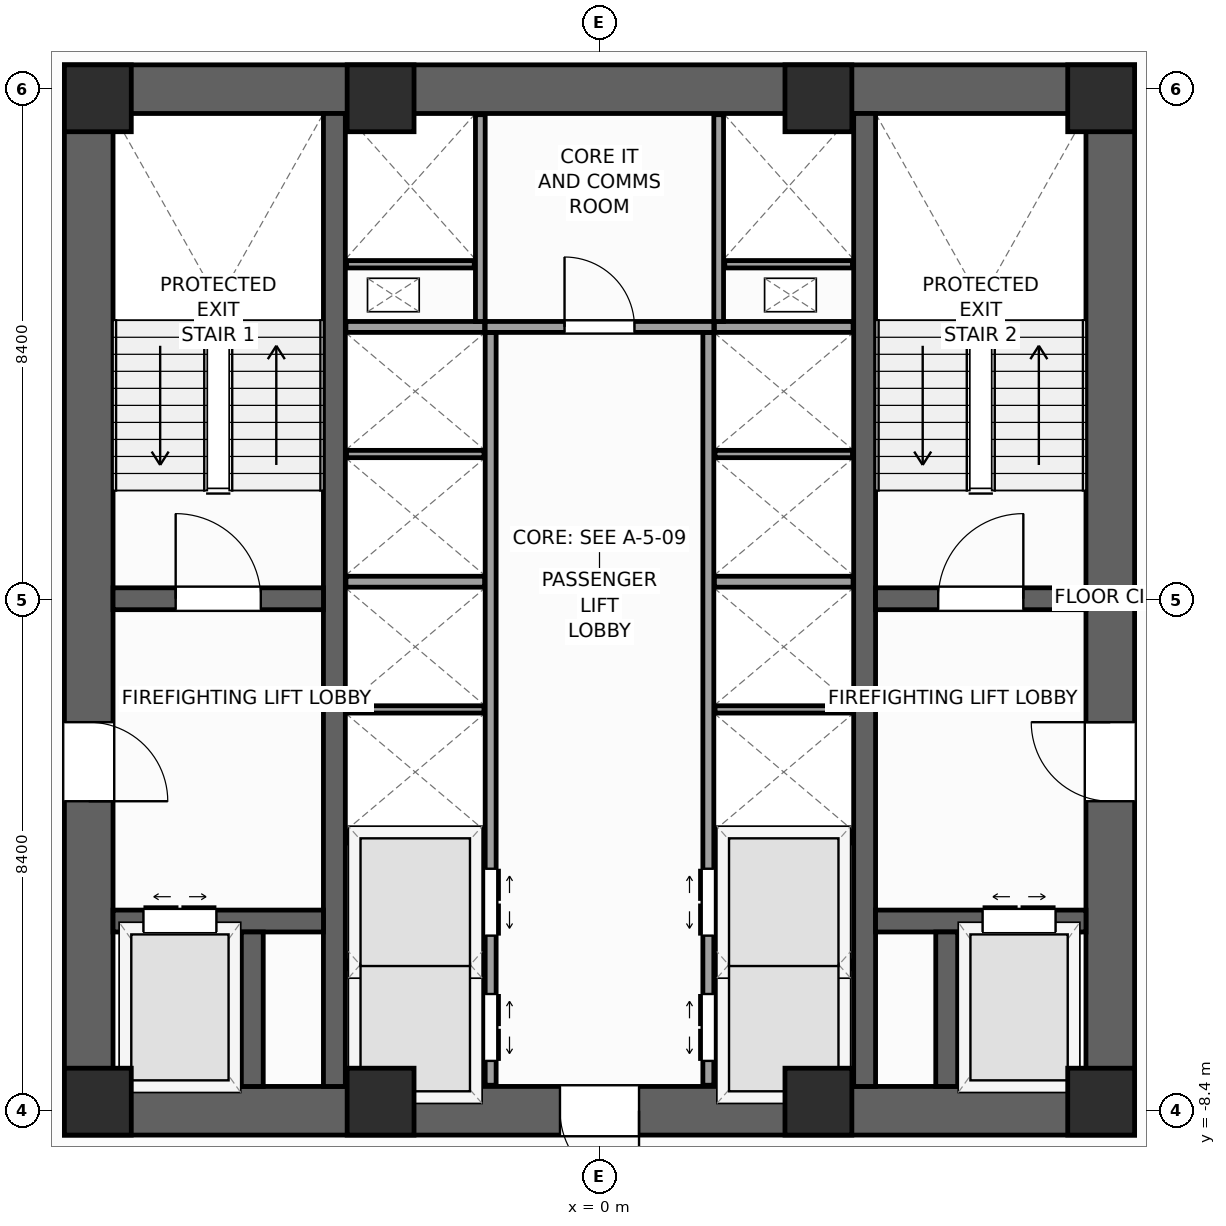
"""IFC4 building model, lengths in metres.
Left out: names, types, materials, properties, quantities, classifications, styles, units other than length and angle.
Written with IfcOpenShell. Run it as: python <this file> out.ifc"""

import sys

from ifc_helpers import new_model, si_unit, direction, frame, frame_2d, origin, origin_2d, place, context, subcontext, project, spatial, rectangle, extrude, source, transform, mapped, element, fill, save


model = new_model("IFC4")
c1 = context("Model", 3, precision=1e-05, world=origin(), true_north=direction((0.0, 1.0)))
c2 = subcontext(c1, "Body", "Model", "MODEL_VIEW")
j1 = project(units=[si_unit("LENGTHUNIT", "METRE"), si_unit("PLANEANGLEUNIT", "RADIAN")], contexts=[c1])
p1 = place(None, origin())
s1 = spatial("IfcSite", under=j1, at=p1, CompositionType="ELEMENT")
p2 = place(p1, origin())
s2 = spatial("IfcBuilding", under=s1, at=p2, CompositionType="ELEMENT")
p3 = place(p2, frame((0.0, 0.0, 34.0)))
s3 = spatial("IfcBuildingStorey", under=s2, at=p3, CompositionType="ELEMENT", Elevation=34.0)
p4 = place(p3, frame((-8.8, -8.4, 0.0), z_axis=(0.0, 0.0, 1.0), x_axis=(1.0, 0.0, 0.0)))
e1 = element("IfcWall", 1, at=p4, inside=s3, PredefinedType="SHEAR", context=c2, shape_type="SweptSolid", body=[
    extrude(rectangle(XDim=17.6, YDim=0.8, at=frame_2d((8.8, 0.0))), origin(), (0.0, 0.0, 1.0), 4.0),
])
p5 = place(p4, frame((8.15, 0.0, 0.0)))
e2 = element("IfcOpeningElement", 2, at=p5, cuts=e1, PredefinedType="OPENING", context=c2, shape_type="SweptSolid", body=[
    extrude(rectangle(XDim=1.3, YDim=2.2, at=frame_2d((0.65, 1.1))), frame((0.0, 0.41, 0.0), z_axis=(0.0, -1.0, 0.0), x_axis=(1.0, 0.0, 0.0)), (0.0, 0.0, 1.0), 0.82),
])
p6 = place(p3, frame((-8.8, 8.4, 0.0), z_axis=(0.0, 0.0, 1.0), x_axis=(1.0, 0.0, 0.0)))
e3 = element("IfcWall", 3, at=p6, inside=s3, PredefinedType="SHEAR", context=c2, shape_type="SweptSolid", body=[
    extrude(rectangle(XDim=17.6, YDim=0.8, at=frame_2d((8.8, 0.0))), origin(), (0.0, 0.0, 1.0), 4.0),
])
p7 = place(p3, frame((-8.4, -8.0, 0.0), z_axis=(0.0, 0.0, 1.0), x_axis=(0.0, 1.0, 0.0)))
e4 = element("IfcWall", 4, at=p7, inside=s3, PredefinedType="SHEAR", context=c2, shape_type="SweptSolid", body=[
    extrude(rectangle(XDim=16.0, YDim=0.8, at=frame_2d((8.0, 0.0))), origin(), (0.0, 0.0, 1.0), 4.0),
])
p8 = place(p7, frame((4.69, 0.0, 0.0)))
e5 = element("IfcOpeningElement", 5, at=p8, cuts=e4, PredefinedType="OPENING", context=c2, shape_type="SweptSolid", body=[
    extrude(rectangle(XDim=1.3, YDim=2.2, at=frame_2d((0.65, 1.1))), frame((0.0, 0.41, 0.0), z_axis=(0.0, -1.0, 0.0), x_axis=(1.0, 0.0, 0.0)), (0.0, 0.0, 1.0), 0.82),
])
p9 = place(p3, frame((8.4, -8.0, 0.0), z_axis=(0.0, 0.0, 1.0), x_axis=(0.0, 1.0, 0.0)))
e6 = element("IfcWall", 6, at=p9, inside=s3, PredefinedType="SHEAR", context=c2, shape_type="SweptSolid", body=[
    extrude(rectangle(XDim=16.0, YDim=0.8, at=frame_2d((8.0, 0.0))), origin(), (0.0, 0.0, 1.0), 4.0),
])
p10 = place(p9, frame((4.69, 0.0, 0.0)))
e7 = element("IfcOpeningElement", 7, at=p10, cuts=e6, PredefinedType="OPENING", context=c2, shape_type="SweptSolid", body=[
    extrude(rectangle(XDim=1.3, YDim=2.2, at=frame_2d((0.65, 1.1))), frame((0.0, 0.41, 0.0), z_axis=(0.0, -1.0, 0.0), x_axis=(1.0, 0.0, 0.0)), (0.0, 0.0, 1.0), 0.82),
])
for number, where, z_axis, x_axis in (
    (8, (-4.36, -8.0, 0.0), (0.0, 0.0, 1.0), (0.0, 1.0, 0.0)),
    (9, (4.36, -8.0, 0.0), (0.0, 0.0, 1.0), (0.0, 1.0, 0.0)),
):
    element("IfcWall", number, at=place(p3, frame(where, z_axis=z_axis, x_axis=x_axis)), inside=s3, PredefinedType="SHEAR", context=c2, shape_type="SweptSolid", body=[
        extrude(rectangle(XDim=16.0, YDim=0.36, at=frame_2d((8.0, 0.0))), origin(), (0.0, 0.0, 1.0), 4.0),
    ])
p11 = place(p3, frame((-8.0, 0.02, 0.0), z_axis=(0.0, 0.0, 1.0), x_axis=(1.0, 0.0, 0.0)))
e10 = element("IfcWall", 10, at=p11, inside=s3, PredefinedType="SHEAR", context=c2, shape_type="SweptSolid", body=[
    extrude(rectangle(XDim=3.46, YDim=0.36, at=frame_2d((1.73, 0.0))), origin(), (0.0, 0.0, 1.0), 4.0),
])
p12 = place(p11, frame((1.03, 0.0, 0.0)))
e11 = element("IfcOpeningElement", 11, at=p12, cuts=e10, PredefinedType="OPENING", context=c2, shape_type="SweptSolid", body=[
    extrude(rectangle(XDim=1.4, YDim=2.2, at=frame_2d((0.7, 1.1))), frame((0.0, 0.19, 0.0), z_axis=(0.0, -1.0, 0.0), x_axis=(1.0, 0.0, 0.0)), (0.0, 0.0, 1.0), 0.38),
])
p13 = place(p3, frame((4.54, 0.02, 0.0), z_axis=(0.0, 0.0, 1.0), x_axis=(1.0, 0.0, 0.0)))
e12 = element("IfcWall", 12, at=p13, inside=s3, PredefinedType="SHEAR", context=c2, shape_type="SweptSolid", body=[
    extrude(rectangle(XDim=3.46, YDim=0.36, at=frame_2d((1.73, 0.0))), origin(), (0.0, 0.0, 1.0), 4.0),
])
p14 = place(p13, frame((1.03, 0.0, 0.0)))
e13 = element("IfcOpeningElement", 13, at=p14, cuts=e12, PredefinedType="OPENING", context=c2, shape_type="SweptSolid", body=[
    extrude(rectangle(XDim=1.4, YDim=2.2, at=frame_2d((0.7, 1.1))), frame((0.0, 0.19, 0.0), z_axis=(0.0, -1.0, 0.0), x_axis=(1.0, 0.0, 0.0)), (0.0, 0.0, 1.0), 0.38),
])
p15 = place(p3, frame((-8.0, -5.28, 0.0), z_axis=(0.0, 0.0, 1.0), x_axis=(1.0, 0.0, 0.0)))
e14 = element("IfcWall", 14, at=p15, inside=s3, PredefinedType="SHEAR", context=c2, shape_type="SweptSolid", body=[
    extrude(rectangle(XDim=3.46, YDim=0.36, at=frame_2d((1.73, 0.0))), origin(), (0.0, 0.0, 1.0), 4.0),
])
p16 = place(p15, frame((0.5, 0.0, 0.0)))
e15 = element("IfcOpeningElement", 15, at=p16, cuts=e14, PredefinedType="OPENING", context=c2, shape_type="SweptSolid", body=[
    extrude(rectangle(XDim=1.2, YDim=2.25, at=frame_2d((0.6, 1.125))), frame((0.0, 0.19, 0.0), z_axis=(0.0, -1.0, 0.0), x_axis=(1.0, 0.0, 0.0)), (0.0, 0.0, 1.0), 0.38),
])
p17 = place(p3, frame((4.54, -5.28, 0.0), z_axis=(0.0, 0.0, 1.0), x_axis=(1.0, 0.0, 0.0)))
e16 = element("IfcWall", 16, at=p17, inside=s3, PredefinedType="SHEAR", context=c2, shape_type="SweptSolid", body=[
    extrude(rectangle(XDim=3.46, YDim=0.36, at=frame_2d((1.73, 0.0))), origin(), (0.0, 0.0, 1.0), 4.0),
])
p18 = place(p17, frame((1.76, 0.0, 0.0)))
e17 = element("IfcOpeningElement", 17, at=p18, cuts=e16, PredefinedType="OPENING", context=c2, shape_type="SweptSolid", body=[
    extrude(rectangle(XDim=1.2, YDim=2.25, at=frame_2d((0.6, 1.125))), frame((0.0, 0.19, 0.0), z_axis=(0.0, -1.0, 0.0), x_axis=(1.0, 0.0, 0.0)), (0.0, 0.0, 1.0), 0.38),
])
for number, where, z_axis, x_axis in (
    (18, (-5.71, -8.0, 0.0), (0.0, 0.0, 1.0), (0.0, 1.0, 0.0)),
    (19, (5.71, -8.0, 0.0), (0.0, 0.0, 1.0), (0.0, 1.0, 0.0)),
):
    element("IfcWall", number, at=place(p3, frame(where, z_axis=z_axis, x_axis=x_axis)), inside=s3, PredefinedType="SHEAR", context=c2, shape_type="SweptSolid", body=[
        extrude(rectangle(XDim=2.54, YDim=0.36, at=frame_2d((1.27, 0.0))), origin(), (0.0, 0.0, 1.0), 4.0),
    ])
m1 = source(origin(), c2, "Body", "SweptSolid", [
    extrude(rectangle(XDim=1.1, YDim=1.1, at=origin_2d()), origin(), (0.0, 0.0, 1.0), 4.0),
])
for number, where, z_axis, x_axis in (
    (20, (-8.25, -8.25, 0.0), (0.0, 0.0, 1.0), (1.0, 0.0, 0.0)),
    (21, (8.25, -8.25, 0.0), (0.0, 0.0, 1.0), (1.0, 0.0, 0.0)),
    (22, (8.25, 8.25, 0.0), (0.0, 0.0, 1.0), (1.0, 0.0, 0.0)),
    (23, (-8.25, 8.25, 0.0), (0.0, 0.0, 1.0), (1.0, 0.0, 0.0)),
    (24, (-3.6, -8.25, 0.0), (0.0, 0.0, 1.0), (1.0, 0.0, 0.0)),
    (25, (3.6, -8.25, 0.0), (0.0, 0.0, 1.0), (1.0, 0.0, 0.0)),
    (26, (-3.6, 8.25, 0.0), (0.0, 0.0, 1.0), (1.0, 0.0, 0.0)),
    (27, (3.6, 8.25, 0.0), (0.0, 0.0, 1.0), (1.0, 0.0, 0.0)),
):
    element("IfcColumn", number, at=place(p3, frame(where, z_axis=z_axis, x_axis=x_axis)), inside=s3, PredefinedType="PILASTER", context=c2, shape_type="MappedRepresentation", body=[
        mapped(m1, transform((0.0, 0.0, 0.0), scale=1.0)),
    ])
p19 = place(p3, frame((-1.79, -7.98, 0.0), z_axis=(0.0, 0.0, 1.0), x_axis=(0.0, 1.0, 0.0)))
e28 = element("IfcWall", 28, at=p19, inside=s3, PredefinedType="PARTITIONING", context=c2, shape_type="SweptSolid", body=[
    extrude(rectangle(XDim=12.38, YDim=0.18, at=frame_2d((6.19, 0.0))), origin(), (0.0, 0.0, 1.0), 3.72),
])
p20 = place(p19, frame((0.4, 0.0, 0.0)))
e29 = element("IfcOpeningElement", 29, at=p20, cuts=e28, PredefinedType="OPENING", context=c2, shape_type="SweptSolid", body=[
    extrude(rectangle(XDim=1.1, YDim=2.2, at=frame_2d((0.55, 1.1))), frame((0.0, 0.1, 0.0), z_axis=(0.0, -1.0, 0.0), x_axis=(1.0, 0.0, 0.0)), (0.0, 0.0, 1.0), 0.2),
])
p21 = place(p19, frame((2.46, 0.0, 0.0)))
e30 = element("IfcOpeningElement", 30, at=p21, cuts=e28, PredefinedType="OPENING", context=c2, shape_type="SweptSolid", body=[
    extrude(rectangle(XDim=1.1, YDim=2.2, at=frame_2d((0.55, 1.1))), frame((0.0, 0.1, 0.0), z_axis=(0.0, -1.0, 0.0), x_axis=(1.0, 0.0, 0.0)), (0.0, 0.0, 1.0), 0.2),
])
p22 = place(p3, frame((1.79, -7.98, 0.0), z_axis=(0.0, 0.0, 1.0), x_axis=(0.0, 1.0, 0.0)))
e31 = element("IfcWall", 31, at=p22, inside=s3, PredefinedType="PARTITIONING", context=c2, shape_type="SweptSolid", body=[
    extrude(rectangle(XDim=12.38, YDim=0.18, at=frame_2d((6.19, 0.0))), origin(), (0.0, 0.0, 1.0), 3.72),
])
p23 = place(p22, frame((0.4, 0.0, 0.0)))
e32 = element("IfcOpeningElement", 32, at=p23, cuts=e31, PredefinedType="OPENING", context=c2, shape_type="SweptSolid", body=[
    extrude(rectangle(XDim=1.1, YDim=2.2, at=frame_2d((0.55, 1.1))), frame((0.0, 0.1, 0.0), z_axis=(0.0, -1.0, 0.0), x_axis=(1.0, 0.0, 0.0)), (0.0, 0.0, 1.0), 0.2),
])
p24 = place(p22, frame((2.46, 0.0, 0.0)))
e33 = element("IfcOpeningElement", 33, at=p24, cuts=e31, PredefinedType="OPENING", context=c2, shape_type="SweptSolid", body=[
    extrude(rectangle(XDim=1.1, YDim=2.2, at=frame_2d((0.55, 1.1))), frame((0.0, 0.1, 0.0), z_axis=(0.0, -1.0, 0.0), x_axis=(1.0, 0.0, 0.0)), (0.0, 0.0, 1.0), 0.2),
])
p25 = place(p3, frame((-1.88, 4.49, 0.0), z_axis=(0.0, 0.0, 1.0), x_axis=(1.0, 0.0, 0.0)))
e34 = element("IfcWall", 34, at=p25, inside=s3, PredefinedType="PARTITIONING", context=c2, shape_type="SweptSolid", body=[
    extrude(rectangle(XDim=3.76, YDim=0.18, at=frame_2d((1.88, 0.0))), origin(), (0.0, 0.0, 1.0), 3.72),
])
p26 = place(p25, frame((1.305, 0.0, 0.0)))
e35 = element("IfcOpeningElement", 35, at=p26, cuts=e34, PredefinedType="OPENING", context=c2, shape_type="SweptSolid", body=[
    extrude(rectangle(XDim=1.15, YDim=2.25, at=frame_2d((0.575, 1.125))), frame((0.0, 0.1, 0.0), z_axis=(0.0, -1.0, 0.0), x_axis=(1.0, 0.0, 0.0)), (0.0, 0.0, 1.0), 0.2),
])
for number, where, z_axis, x_axis in (
    (36, (-4.17, -3.9, 0.0), (0.0, 0.0, 1.0), (1.0, 0.0, 0.0)),
    (37, (1.89, -3.9, 0.0), (0.0, 0.0, 1.0), (1.0, 0.0, 0.0)),
    (38, (-4.17, 0.3, 0.0), (0.0, 0.0, 1.0), (1.0, 0.0, 0.0)),
    (39, (1.89, 0.3, 0.0), (0.0, 0.0, 1.0), (1.0, 0.0, 0.0)),
    (40, (-4.17, 4.49, 0.0), (0.0, 0.0, 1.0), (1.0, 0.0, 0.0)),
    (41, (1.89, 4.49, 0.0), (0.0, 0.0, 1.0), (1.0, 0.0, 0.0)),
):
    element("IfcWall", number, at=place(p3, frame(where, z_axis=z_axis, x_axis=x_axis)), inside=s3, PredefinedType="PARTITIONING", context=c2, shape_type="SweptSolid", body=[
        extrude(rectangle(XDim=2.28, YDim=0.18, at=frame_2d((1.14, 0.0))), origin(), (0.0, 0.0, 1.0), 3.72),
    ])
for number, where, z_axis, x_axis in (
    (42, (-4.16, -6.0, 0.0), (0.0, 0.0, 1.0), (1.0, 0.0, 0.0)),
    (43, (1.9, -6.0, 0.0), (0.0, 0.0, 1.0), (1.0, 0.0, 0.0)),
    (44, (-4.16, -1.8, 0.0), (0.0, 0.0, 1.0), (1.0, 0.0, 0.0)),
    (45, (1.9, -1.8, 0.0), (0.0, 0.0, 1.0), (1.0, 0.0, 0.0)),
    (46, (-4.16, 2.4, 0.0), (0.0, 0.0, 1.0), (1.0, 0.0, 0.0)),
    (47, (1.9, 2.4, 0.0), (0.0, 0.0, 1.0), (1.0, 0.0, 0.0)),
):
    element("IfcWall", number, at=place(p3, frame(where, z_axis=z_axis, x_axis=x_axis)), inside=s3, PredefinedType="PARTITIONING", context=c2, shape_type="SweptSolid", body=[
        extrude(rectangle(XDim=2.26, YDim=0.12, at=frame_2d((1.13, 0.0))), origin(), (0.0, 0.0, 1.0), 3.72),
    ])
for number, where, z_axis, x_axis in (
    (48, (-1.96, 4.58, 0.0), (0.0, 0.0, 1.0), (0.0, 1.0, 0.0)),
    (49, (1.96, 4.58, 0.0), (0.0, 0.0, 1.0), (0.0, 1.0, 0.0)),
):
    element("IfcWall", number, at=place(p3, frame(where, z_axis=z_axis, x_axis=x_axis)), inside=s3, PredefinedType="PARTITIONING", context=c2, shape_type="SweptSolid", body=[
        extrude(rectangle(XDim=3.4, YDim=0.16, at=frame_2d((1.7, 0.0))), origin(), (0.0, 0.0, 1.0), 3.72),
    ])
for number, where, z_axis, x_axis in (
    (50, (-4.16, 5.52, 0.0), (0.0, 0.0, 1.0), (1.0, 0.0, 0.0)),
    (51, (2.06, 5.52, 0.0), (0.0, 0.0, 1.0), (1.0, 0.0, 0.0)),
):
    element("IfcWall", number, at=place(p3, frame(where, z_axis=z_axis, x_axis=x_axis)), inside=s3, PredefinedType="PARTITIONING", context=c2, shape_type="SweptSolid", body=[
        extrude(rectangle(XDim=2.1, YDim=0.12, at=frame_2d((1.05, 0.0))), origin(), (0.0, 0.0, 1.0), 3.72),
    ])
m2 = source(origin(), c2, "Body", "SweptSolid", [
    extrude(rectangle(XDim=1.4, YDim=2.2, at=frame_2d((0.7, 1.1))), frame((0.0, 0.025, 0.0), z_axis=(0.0, -1.0, 0.0), x_axis=(1.0, 0.0, 0.0)), (0.0, 0.0, 1.0), 0.05),
])
p27 = place(p12, origin())
e52 = element("IfcDoor", 52, at=p27, inside=s3, OperationType="SINGLE_SWING_LEFT", PredefinedType="DOOR", context=c2, shape_type="MappedRepresentation", body=[
    mapped(m2, transform((0.0, 0.0, 0.0), scale=1.0)),
])
fill(e11, e52)
p28 = place(p14, origin())
e53 = element("IfcDoor", 53, at=p28, inside=s3, OperationType="SINGLE_SWING_RIGHT", PredefinedType="DOOR", context=c2, shape_type="MappedRepresentation", body=[
    mapped(m2, transform((0.0, 0.0, 0.0), scale=1.0)),
])
fill(e13, e53)
m3 = source(origin(), c2, "Body", "SweptSolid", [
    extrude(rectangle(XDim=1.3, YDim=2.2, at=frame_2d((0.65, 1.1))), frame((0.0, 0.025, 0.0), z_axis=(0.0, -1.0, 0.0), x_axis=(1.0, 0.0, 0.0)), (0.0, 0.0, 1.0), 0.05),
])
p29 = place(p8, frame((1.3, 0.0, 0.0), z_axis=(0.0, 0.0, 1.0), x_axis=(-1.0, 0.0, 0.0)))
e54 = element("IfcDoor", 54, at=p29, inside=s3, OperationType="SINGLE_SWING_LEFT", PredefinedType="DOOR", context=c2, shape_type="MappedRepresentation", body=[
    mapped(m3, transform((0.0, 0.0, 0.0), scale=1.0)),
])
fill(e5, e54)
p30 = place(p10, origin())
e55 = element("IfcDoor", 55, at=p30, inside=s3, OperationType="SINGLE_SWING_RIGHT", PredefinedType="DOOR", context=c2, shape_type="MappedRepresentation", body=[
    mapped(m3, transform((0.0, 0.0, 0.0), scale=1.0)),
])
fill(e7, e55)
p31 = place(p5, frame((1.3, 0.0, 0.0), z_axis=(0.0, 0.0, 1.0), x_axis=(-1.0, 0.0, 0.0)))
e56 = element("IfcDoor", 56, at=p31, inside=s3, OperationType="SINGLE_SWING_RIGHT", PredefinedType="DOOR", context=c2, shape_type="MappedRepresentation", body=[
    mapped(m3, transform((0.0, 0.0, 0.0), scale=1.0)),
])
fill(e2, e56)
m4 = source(origin(), c2, "Body", "SweptSolid", [
    extrude(rectangle(XDim=1.2, YDim=2.25, at=frame_2d((0.6, 1.125))), frame((0.0, 0.025, 0.0), z_axis=(0.0, -1.0, 0.0), x_axis=(1.0, 0.0, 0.0)), (0.0, 0.0, 1.0), 0.05),
])
p32 = place(p16, origin())
e57 = element("IfcDoor", 57, at=p32, inside=s3, OperationType="DOUBLE_DOOR_SLIDING", PredefinedType="DOOR", context=c2, shape_type="MappedRepresentation", body=[
    mapped(m4, transform((0.0, 0.0, 0.0), scale=1.0)),
])
fill(e15, e57)
p33 = place(p18, origin())
e58 = element("IfcDoor", 58, at=p33, inside=s3, OperationType="DOUBLE_DOOR_SLIDING", PredefinedType="DOOR", context=c2, shape_type="MappedRepresentation", body=[
    mapped(m4, transform((0.0, 0.0, 0.0), scale=1.0)),
])
fill(e17, e58)
m5 = source(origin(), c2, "Body", "SweptSolid", [
    extrude(rectangle(XDim=1.1, YDim=2.2, at=frame_2d((0.55, 1.1))), frame((0.0, 0.025, 0.0), z_axis=(0.0, -1.0, 0.0), x_axis=(1.0, 0.0, 0.0)), (0.0, 0.0, 1.0), 0.05),
])
p34 = place(p20, frame((1.1, 0.0, 0.0), z_axis=(0.0, 0.0, 1.0), x_axis=(-1.0, 0.0, 0.0)))
e59 = element("IfcDoor", 59, at=p34, inside=s3, OperationType="DOUBLE_DOOR_SLIDING", PredefinedType="DOOR", context=c2, shape_type="MappedRepresentation", body=[
    mapped(m5, transform((0.0, 0.0, 0.0), scale=1.0)),
])
fill(e29, e59)
p35 = place(p21, frame((1.1, 0.0, 0.0), z_axis=(0.0, 0.0, 1.0), x_axis=(-1.0, 0.0, 0.0)))
e60 = element("IfcDoor", 60, at=p35, inside=s3, OperationType="DOUBLE_DOOR_SLIDING", PredefinedType="DOOR", context=c2, shape_type="MappedRepresentation", body=[
    mapped(m5, transform((0.0, 0.0, 0.0), scale=1.0)),
])
fill(e30, e60)
p36 = place(p23, origin())
e61 = element("IfcDoor", 61, at=p36, inside=s3, OperationType="DOUBLE_DOOR_SLIDING", PredefinedType="DOOR", context=c2, shape_type="MappedRepresentation", body=[
    mapped(m5, transform((0.0, 0.0, 0.0), scale=1.0)),
])
fill(e32, e61)
p37 = place(p24, origin())
e62 = element("IfcDoor", 62, at=p37, inside=s3, OperationType="DOUBLE_DOOR_SLIDING", PredefinedType="DOOR", context=c2, shape_type="MappedRepresentation", body=[
    mapped(m5, transform((0.0, 0.0, 0.0), scale=1.0)),
])
fill(e33, e62)
m6 = source(origin(), c2, "Body", "SweptSolid", [
    extrude(rectangle(XDim=1.15, YDim=2.25, at=frame_2d((0.575, 1.125))), frame((0.0, 0.025, 0.0), z_axis=(0.0, -1.0, 0.0), x_axis=(1.0, 0.0, 0.0)), (0.0, 0.0, 1.0), 0.05),
])
p38 = place(p26, origin())
e63 = element("IfcDoor", 63, at=p38, inside=s3, OperationType="SINGLE_SWING_LEFT", PredefinedType="DOOR", context=c2, shape_type="MappedRepresentation", body=[
    mapped(m6, transform((0.0, 0.0, 0.0), scale=1.0)),
])
fill(e35, e63)
save(model, sys.argv[1])
